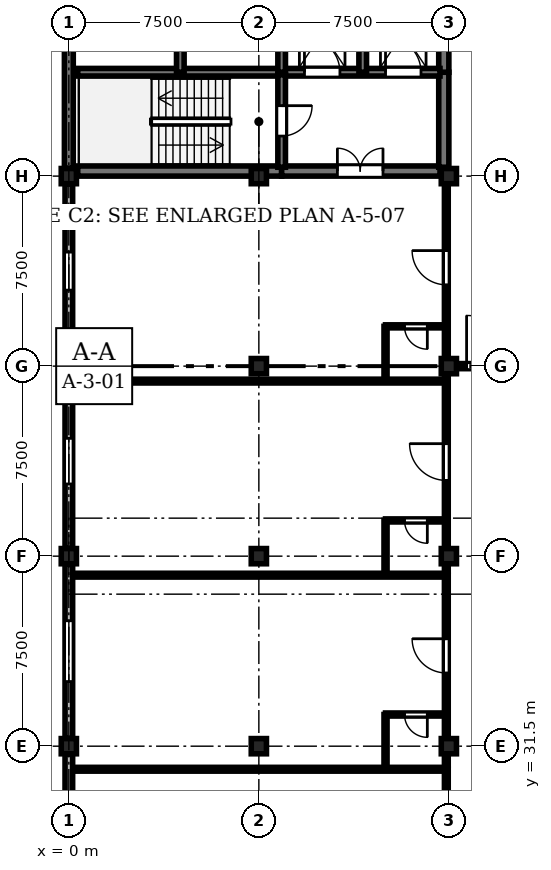
"""IFC4 building model, lengths in metres.
Left out: names, types, materials, properties, quantities, classifications, styles, units other than length and angle.
Written with IfcOpenShell. Run it as: python <this file> out.ifc"""

import sys

from ifc_helpers import new_model, si_unit, direction, frame, frame_2d, origin, origin_2d, place, context, subcontext, project, spatial, rectangle, circle, extrude, element, fill, save


model = new_model("IFC4")
c1 = context("Model", 3, precision=1e-05, world=origin(), true_north=direction((0.0, 1.0)))
c2 = subcontext(c1, "Body", "Model", "MODEL_VIEW")
j1 = project(units=[si_unit("LENGTHUNIT", "METRE"), si_unit("PLANEANGLEUNIT", "RADIAN")], contexts=[c1])
p1 = place(None, origin())
s1 = spatial("IfcSite", under=j1, at=p1, CompositionType="ELEMENT")
p2 = place(p1, origin())
s2 = spatial("IfcBuilding", under=s1, at=p2, CompositionType="ELEMENT")
p3 = place(p2, frame((0.0, 0.0, 21.9)))
s3 = spatial("IfcBuildingStorey", under=s2, at=p3, CompositionType="ELEMENT", Elevation=21.9)
for number, where, z_axis, x_axis in (
    (1, (0.0, 31.5, 0.0), (0.0, 0.0, 1.0), (1.0, 0.0, 0.0)),
    (2, (0.0, 39.0, 0.0), (0.0, 0.0, 1.0), (1.0, 0.0, 0.0)),
):
    element("IfcColumn", number, at=place(p3, frame(where, z_axis=z_axis, x_axis=x_axis)), inside=s3, PredefinedType="COLUMN", context=c2, shape_type="SweptSolid", body=[
        extrude(rectangle(XDim=0.6, YDim=0.6, at=origin_2d()), origin(), (0.0, 0.0, 1.0), 4.05),
    ])
p4 = place(p3, frame((0.0, 46.5, 0.0), z_axis=(0.0, 0.0, 1.0), x_axis=(1.0, 0.0, 0.0)))
e3 = element("IfcColumn", 3, at=p4, inside=s3, PredefinedType="COLUMN", context=c2, shape_type="SweptSolid", body=[
    extrude(circle(Radius=0.3, at=origin_2d()), origin(), (0.0, 0.0, 1.0), 4.05),
])
for number, where, z_axis, x_axis in (
    (4, (0.0, 54.0, 0.0), (0.0, 0.0, 1.0), (1.0, 0.0, 0.0)),
    (5, (7.5, 31.5, 0.0), (0.0, 0.0, 1.0), (1.0, 0.0, 0.0)),
):
    element("IfcColumn", number, at=place(p3, frame(where, z_axis=z_axis, x_axis=x_axis)), inside=s3, PredefinedType="COLUMN", context=c2, shape_type="SweptSolid", body=[
        extrude(rectangle(XDim=0.6, YDim=0.6, at=origin_2d()), origin(), (0.0, 0.0, 1.0), 4.05),
    ])
p5 = place(p3, frame((7.5, 39.0, 0.0), z_axis=(0.0, 0.0, 1.0), x_axis=(1.0, 0.0, 0.0)))
e6 = element("IfcColumn", 6, at=p5, inside=s3, PredefinedType="COLUMN", context=c2, shape_type="SweptSolid", body=[
    extrude(circle(Radius=0.3, at=origin_2d()), origin(), (0.0, 0.0, 1.0), 4.05),
])
for number, where, z_axis, x_axis in (
    (7, (7.5, 46.5, 0.0), (0.0, 0.0, 1.0), (1.0, 0.0, 0.0)),
    (8, (7.5, 54.0, 0.0), (0.0, 0.0, 1.0), (1.0, 0.0, 0.0)),
):
    element("IfcColumn", number, at=place(p3, frame(where, z_axis=z_axis, x_axis=x_axis)), inside=s3, PredefinedType="COLUMN", context=c2, shape_type="SweptSolid", body=[
        extrude(rectangle(XDim=0.6, YDim=0.6, at=origin_2d()), origin(), (0.0, 0.0, 1.0), 4.05),
    ])
p6 = place(p3, frame((15.0, 31.5, 0.0), z_axis=(0.0, 0.0, 1.0), x_axis=(1.0, 0.0, 0.0)))
e9 = element("IfcColumn", 9, at=p6, inside=s3, PredefinedType="COLUMN", context=c2, shape_type="SweptSolid", body=[
    extrude(circle(Radius=0.3, at=origin_2d()), origin(), (0.0, 0.0, 1.0), 4.05),
])
for number, where, z_axis, x_axis in (
    (10, (15.0, 39.0, 0.0), (0.0, 0.0, 1.0), (1.0, 0.0, 0.0)),
    (11, (15.0, 46.5, 0.0), (0.0, 0.0, 1.0), (1.0, 0.0, 0.0)),
):
    element("IfcColumn", number, at=place(p3, frame(where, z_axis=z_axis, x_axis=x_axis)), inside=s3, PredefinedType="COLUMN", context=c2, shape_type="SweptSolid", body=[
        extrude(rectangle(XDim=0.6, YDim=0.6, at=origin_2d()), origin(), (0.0, 0.0, 1.0), 4.05),
    ])
p7 = place(p3, frame((15.0, 54.0, 0.0), z_axis=(0.0, 0.0, 1.0), x_axis=(1.0, 0.0, 0.0)))
e12 = element("IfcColumn", 12, at=p7, inside=s3, PredefinedType="COLUMN", context=c2, shape_type="SweptSolid", body=[
    extrude(circle(Radius=0.3, at=origin_2d()), origin(), (0.0, 0.0, 1.0), 4.05),
])
p8 = place(p3, frame((0.0, 22.81, 0.0), z_axis=(0.0, 0.0, 1.0), x_axis=(0.0, 1.0, 0.0)))
e13 = element("IfcWall", 13, at=p8, inside=s3, PredefinedType="STANDARD", context=c2, shape_type="SweptSolid", body=[
    extrude(rectangle(XDim=8.38, YDim=0.3, at=frame_2d((4.19, 0.0))), origin(), (0.0, 0.0, 1.0), 3.22),
])
p9 = place(p8, frame((3.14, 0.0, 0.9)))
e14 = element("IfcOpeningElement", 14, at=p9, cuts=e13, PredefinedType="OPENING", context=c2, shape_type="SweptSolid", body=[
    extrude(rectangle(XDim=2.1, YDim=2.04, at=frame_2d((1.05, 1.02))), frame((0.0, 0.16, 0.0), z_axis=(0.0, -1.0, 0.0), x_axis=(1.0, 0.0, 0.0)), (0.0, 0.0, 1.0), 0.32),
])
p10 = place(p3, frame((0.0, 31.81, 0.0), z_axis=(0.0, 0.0, 1.0), x_axis=(0.0, 1.0, 0.0)))
e15 = element("IfcWall", 15, at=p10, inside=s3, PredefinedType="STANDARD", context=c2, shape_type="SweptSolid", body=[
    extrude(rectangle(XDim=6.88, YDim=0.3, at=frame_2d((3.44, 0.0))), origin(), (0.0, 0.0, 1.0), 3.17),
])
p11 = place(p10, frame((2.24, 0.0, 0.9)))
e16 = element("IfcOpeningElement", 16, at=p11, cuts=e15, PredefinedType="OPENING", context=c2, shape_type="SweptSolid", body=[
    extrude(rectangle(XDim=2.4, YDim=1.99, at=frame_2d((1.2, 0.995))), frame((0.0, 0.16, 0.0), z_axis=(0.0, -1.0, 0.0), x_axis=(1.0, 0.0, 0.0)), (0.0, 0.0, 1.0), 0.32),
])
p12 = place(p3, frame((0.0, 39.31, 0.0), z_axis=(0.0, 0.0, 1.0), x_axis=(0.0, 1.0, 0.0)))
e17 = element("IfcWall", 17, at=p12, inside=s3, PredefinedType="STANDARD", context=c2, shape_type="SweptSolid", body=[
    extrude(rectangle(XDim=6.88, YDim=0.3, at=frame_2d((3.44, 0.0))), origin(), (0.0, 0.0, 1.0), 3.17),
])
p13 = place(p12, frame((2.54, 0.0, 0.9)))
e18 = element("IfcOpeningElement", 18, at=p13, cuts=e17, PredefinedType="OPENING", context=c2, shape_type="SweptSolid", body=[
    extrude(rectangle(XDim=1.8, YDim=1.99, at=frame_2d((0.9, 0.995))), frame((0.0, 0.16, 0.0), z_axis=(0.0, -1.0, 0.0), x_axis=(1.0, 0.0, 0.0)), (0.0, 0.0, 1.0), 0.32),
])
p14 = place(p3, frame((0.0, 46.81, 0.0), z_axis=(0.0, 0.0, 1.0), x_axis=(0.0, 1.0, 0.0)))
e19 = element("IfcWall", 19, at=p14, inside=s3, PredefinedType="STANDARD", context=c2, shape_type="SweptSolid", body=[
    extrude(rectangle(XDim=6.88, YDim=0.3, at=frame_2d((3.44, 0.0))), origin(), (0.0, 0.0, 1.0), 3.17),
])
p15 = place(p14, frame((2.69, 0.0, 0.9)))
e20 = element("IfcOpeningElement", 20, at=p15, cuts=e19, PredefinedType="OPENING", context=c2, shape_type="SweptSolid", body=[
    extrude(rectangle(XDim=1.5, YDim=1.99, at=frame_2d((0.75, 0.995))), frame((0.0, 0.16, 0.0), z_axis=(0.0, -1.0, 0.0), x_axis=(1.0, 0.0, 0.0)), (0.0, 0.0, 1.0), 0.32),
])
p16 = place(p3, frame((0.0, 54.31, 0.0), z_axis=(0.0, 0.0, 1.0), x_axis=(0.0, 1.0, 0.0)))
e21 = element("IfcWall", 21, at=p16, inside=s3, PredefinedType="SHEAR", context=c2, shape_type="SweptSolid", body=[
    extrude(rectangle(XDim=6.88, YDim=0.35, at=frame_2d((3.44, 0.0))), origin(), (0.0, 0.0, 1.0), 3.77),
])
p17 = place(p3, frame((0.35, 54.2, 0.0), z_axis=(0.0, 0.0, 1.0), x_axis=(1.0, 0.0, 0.0)))
e22 = element("IfcWall", 22, at=p17, inside=s3, PredefinedType="SHEAR", context=c2, shape_type="SweptSolid", body=[
    extrude(rectangle(XDim=8.05, YDim=0.4, at=frame_2d((4.025, 0.0))), origin(), (0.0, 0.0, 1.0), 3.77),
])
p18 = place(p3, frame((8.4, 54.2, 0.0), z_axis=(0.0, 0.0, 1.0), x_axis=(1.0, 0.0, 0.0)))
e23 = element("IfcWall", 23, at=p18, inside=s3, PredefinedType="SHEAR", context=c2, shape_type="SweptSolid", body=[
    extrude(rectangle(XDim=6.25, YDim=0.4, at=frame_2d((3.125, 0.0))), origin(), (0.0, 0.0, 1.0), 3.77),
])
p19 = place(p18, frame((2.2, 0.0, 0.0)))
e24 = element("IfcOpeningElement", 24, at=p19, cuts=e23, PredefinedType="OPENING", context=c2, shape_type="SweptSolid", body=[
    extrude(rectangle(XDim=1.8, YDim=2.25, at=frame_2d((0.9, 1.125))), frame((0.0, 0.21, 0.0), z_axis=(0.0, -1.0, 0.0), x_axis=(1.0, 0.0, 0.0)), (0.0, 0.0, 1.0), 0.42),
])
p20 = place(p3, frame((14.8, 54.35, 0.0), z_axis=(0.0, 0.0, 1.0), x_axis=(0.0, 1.0, 0.0)))
e25 = element("IfcWall", 25, at=p20, inside=s3, PredefinedType="SHEAR", context=c2, shape_type="SweptSolid", body=[
    extrude(rectangle(XDim=3.75, YDim=0.4, at=frame_2d((1.875, 0.0))), origin(), (0.0, 0.0, 1.0), 3.77),
])
p21 = place(p3, frame((14.8, 58.1, 0.0), z_axis=(0.0, 0.0, 1.0), x_axis=(0.0, 1.0, 0.0)))
e26 = element("IfcWall", 26, at=p21, inside=s3, PredefinedType="SHEAR", context=c2, shape_type="SweptSolid", body=[
    extrude(rectangle(XDim=3.05, YDim=0.4, at=frame_2d((1.525, 0.0))), origin(), (0.0, 0.0, 1.0), 3.77),
])
p22 = place(p3, frame((0.35, 58.1, 0.0), z_axis=(0.0, 0.0, 1.0), x_axis=(1.0, 0.0, 0.0)))
e27 = element("IfcWall", 27, at=p22, inside=s3, PredefinedType="SHEAR", context=c2, shape_type="SweptSolid", body=[
    extrude(rectangle(XDim=8.05, YDim=0.3, at=frame_2d((4.025, 0.0))), origin(), (0.0, 0.0, 1.0), 3.77),
])
p23 = place(p3, frame((8.4, 58.1, 0.0), z_axis=(0.0, 0.0, 1.0), x_axis=(1.0, 0.0, 0.0)))
e28 = element("IfcWall", 28, at=p23, inside=s3, PredefinedType="SHEAR", context=c2, shape_type="SweptSolid", body=[
    extrude(rectangle(XDim=6.25, YDim=0.3, at=frame_2d((3.125, 0.0))), origin(), (0.0, 0.0, 1.0), 3.77),
])
p24 = place(p23, frame((0.9, 0.0, 0.0)))
e29 = element("IfcOpeningElement", 29, at=p24, cuts=e28, PredefinedType="OPENING", context=c2, shape_type="SweptSolid", body=[
    extrude(rectangle(XDim=1.4, YDim=2.25, at=frame_2d((0.7, 1.125))), frame((0.0, 0.16, 0.0), z_axis=(0.0, -1.0, 0.0), x_axis=(1.0, 0.0, 0.0)), (0.0, 0.0, 1.0), 0.32),
])
p25 = place(p23, frame((4.1, 0.0, 0.0)))
e30 = element("IfcOpeningElement", 30, at=p25, cuts=e28, PredefinedType="OPENING", context=c2, shape_type="SweptSolid", body=[
    extrude(rectangle(XDim=1.4, YDim=2.25, at=frame_2d((0.7, 1.125))), frame((0.0, 0.16, 0.0), z_axis=(0.0, -1.0, 0.0), x_axis=(1.0, 0.0, 0.0)), (0.0, 0.0, 1.0), 0.32),
])
p26 = place(p3, frame((8.4, 58.0, 0.0), z_axis=(0.0, 0.0, 1.0), x_axis=(0.0, -1.0, 0.0)))
e31 = element("IfcWall", 31, at=p26, inside=s3, PredefinedType="SHEAR", context=c2, shape_type="SweptSolid", body=[
    extrude(rectangle(XDim=3.65, YDim=0.3, at=frame_2d((1.825, 0.0))), origin(), (0.0, 0.0, 1.0), 3.77),
])
p27 = place(p26, frame((1.22, 0.0, 0.0)))
e32 = element("IfcOpeningElement", 32, at=p27, cuts=e31, PredefinedType="OPENING", context=c2, shape_type="SweptSolid", body=[
    extrude(rectangle(XDim=1.2, YDim=2.25, at=frame_2d((0.6, 1.125))), frame((0.0, 0.16, 0.0), z_axis=(0.0, -1.0, 0.0), x_axis=(1.0, 0.0, 0.0)), (0.0, 0.0, 1.0), 0.32),
])
for number, where, z_axis, x_axis in (
    (33, (4.4, 58.1, 0.0), (0.0, 0.0, 1.0), (0.0, 1.0, 0.0)),
    (34, (8.4, 58.1, 0.0), (0.0, 0.0, 1.0), (0.0, 1.0, 0.0)),
    (35, (11.6, 58.1, 0.0), (0.0, 0.0, 1.0), (0.0, 1.0, 0.0)),
):
    element("IfcWall", number, at=place(p3, frame(where, z_axis=z_axis, x_axis=x_axis)), inside=s3, PredefinedType="SHEAR", context=c2, shape_type="SweptSolid", body=[
        extrude(rectangle(XDim=3.15, YDim=0.3, at=frame_2d((1.575, 0.0))), origin(), (0.0, 0.0, 1.0), 3.77),
    ])
p28 = place(p3, frame((14.9, 23.09, 0.0), z_axis=(0.0, 0.0, 1.0), x_axis=(0.0, 1.0, 0.0)))
e36 = element("IfcWall", 36, at=p28, inside=s3, PredefinedType="PARTITIONING", context=c2, shape_type="SweptSolid", body=[
    extrude(rectangle(XDim=7.5, YDim=0.15, at=frame_2d((3.75, 0.0))), origin(), (0.0, 0.0, 1.0), 3.055),
])
p29 = place(p28, frame((3.025, 0.0, 0.0)))
e37 = element("IfcOpeningElement", 37, at=p29, cuts=e36, PredefinedType="OPENING", context=c2, shape_type="SweptSolid", body=[
    extrude(rectangle(XDim=1.45, YDim=2.3, at=frame_2d((0.725, 1.15))), frame((0.0, 0.085, 0.0), z_axis=(0.0, -1.0, 0.0), x_axis=(1.0, 0.0, 0.0)), (0.0, 0.0, 1.0), 0.17),
])
p30 = place(p3, frame((14.9, 30.75, 0.0), z_axis=(0.0, 0.0, 1.0), x_axis=(0.0, 1.0, 0.0)))
e38 = element("IfcWall", 38, at=p30, inside=s3, PredefinedType="PARTITIONING", context=c2, shape_type="SweptSolid", body=[
    extrude(rectangle(XDim=7.5, YDim=0.15, at=frame_2d((3.75, 0.0))), origin(), (0.0, 0.0, 1.0), 3.055),
])
p31 = place(p30, frame((3.64, 0.0, 0.0)))
e39 = element("IfcOpeningElement", 39, at=p31, cuts=e38, PredefinedType="OPENING", context=c2, shape_type="SweptSolid", body=[
    extrude(rectangle(XDim=1.35, YDim=2.25, at=frame_2d((0.675, 1.125))), frame((0.0, 0.085, 0.0), z_axis=(0.0, -1.0, 0.0), x_axis=(1.0, 0.0, 0.0)), (0.0, 0.0, 1.0), 0.17),
])
p32 = place(p3, frame((14.9, 32.75, 0.0), z_axis=(0.0, 0.0, 1.0), x_axis=(-1.0, 0.0, 0.0)))
e40 = element("IfcWall", 40, at=p32, inside=s3, PredefinedType="PARTITIONING", context=c2, shape_type="SweptSolid", body=[
    extrude(rectangle(XDim=2.4, YDim=0.12, at=frame_2d((1.2, 0.0))), origin(), (0.0, 0.0, 1.0), 3.755),
])
p33 = place(p32, frame((0.75, 0.0, 0.0)))
e41 = element("IfcOpeningElement", 41, at=p33, cuts=e40, PredefinedType="OPENING", context=c2, shape_type="SweptSolid", body=[
    extrude(rectangle(XDim=0.9, YDim=2.1, at=frame_2d((0.45, 1.05))), frame((0.0, 0.07, 0.0), z_axis=(0.0, -1.0, 0.0), x_axis=(1.0, 0.0, 0.0)), (0.0, 0.0, 1.0), 0.14),
])
p34 = place(p3, frame((12.5, 30.75, 0.0), z_axis=(0.0, 0.0, 1.0), x_axis=(0.0, 1.0, 0.0)))
e42 = element("IfcWall", 42, at=p34, inside=s3, PredefinedType="PARTITIONING", context=c2, shape_type="SweptSolid", body=[
    extrude(rectangle(XDim=2.0, YDim=0.12, at=frame_2d((1.0, 0.0))), origin(), (0.0, 0.0, 1.0), 3.755),
])
p35 = place(p3, frame((14.9, 38.41, 0.0), z_axis=(0.0, 0.0, 1.0), x_axis=(0.0, 1.0, 0.0)))
e43 = element("IfcWall", 43, at=p35, inside=s3, PredefinedType="PARTITIONING", context=c2, shape_type="SweptSolid", body=[
    extrude(rectangle(XDim=7.5, YDim=0.15, at=frame_2d((3.75, 0.0))), origin(), (0.0, 0.0, 1.0), 3.205),
])
p36 = place(p35, frame((3.58, 0.0, 0.0)))
e44 = element("IfcOpeningElement", 44, at=p36, cuts=e43, PredefinedType="OPENING", context=c2, shape_type="SweptSolid", body=[
    extrude(rectangle(XDim=1.45, YDim=2.3, at=frame_2d((0.725, 1.15))), frame((0.0, 0.085, 0.0), z_axis=(0.0, -1.0, 0.0), x_axis=(1.0, 0.0, 0.0)), (0.0, 0.0, 1.0), 0.17),
])
p37 = place(p3, frame((14.9, 40.41, 0.0), z_axis=(0.0, 0.0, 1.0), x_axis=(-1.0, 0.0, 0.0)))
e45 = element("IfcWall", 45, at=p37, inside=s3, PredefinedType="PARTITIONING", context=c2, shape_type="SweptSolid", body=[
    extrude(rectangle(XDim=2.4, YDim=0.12, at=frame_2d((1.2, 0.0))), origin(), (0.0, 0.0, 1.0), 3.755),
])
p38 = place(p37, frame((0.75, 0.0, 0.0)))
e46 = element("IfcOpeningElement", 46, at=p38, cuts=e45, PredefinedType="OPENING", context=c2, shape_type="SweptSolid", body=[
    extrude(rectangle(XDim=0.9, YDim=2.1, at=frame_2d((0.45, 1.05))), frame((0.0, 0.07, 0.0), z_axis=(0.0, -1.0, 0.0), x_axis=(1.0, 0.0, 0.0)), (0.0, 0.0, 1.0), 0.14),
])
p39 = place(p3, frame((12.5, 38.41, 0.0), z_axis=(0.0, 0.0, 1.0), x_axis=(0.0, 1.0, 0.0)))
e47 = element("IfcWall", 47, at=p39, inside=s3, PredefinedType="PARTITIONING", context=c2, shape_type="SweptSolid", body=[
    extrude(rectangle(XDim=2.0, YDim=0.12, at=frame_2d((1.0, 0.0))), origin(), (0.0, 0.0, 1.0), 3.755),
])
p40 = place(p3, frame((14.9, 46.07, 0.0), z_axis=(0.0, 0.0, 1.0), x_axis=(0.0, 1.0, 0.0)))
e48 = element("IfcWall", 48, at=p40, inside=s3, PredefinedType="PARTITIONING", context=c2, shape_type="SweptSolid", body=[
    extrude(rectangle(XDim=7.5, YDim=0.15, at=frame_2d((3.75, 0.0))), origin(), (0.0, 0.0, 1.0), 3.205),
])
p41 = place(p40, frame((3.64, 0.0, 0.0)))
e49 = element("IfcOpeningElement", 49, at=p41, cuts=e48, PredefinedType="OPENING", context=c2, shape_type="SweptSolid", body=[
    extrude(rectangle(XDim=1.35, YDim=2.25, at=frame_2d((0.675, 1.125))), frame((0.0, 0.085, 0.0), z_axis=(0.0, -1.0, 0.0), x_axis=(1.0, 0.0, 0.0)), (0.0, 0.0, 1.0), 0.17),
])
p42 = place(p3, frame((14.9, 48.07, 0.0), z_axis=(0.0, 0.0, 1.0), x_axis=(-1.0, 0.0, 0.0)))
e50 = element("IfcWall", 50, at=p42, inside=s3, PredefinedType="PARTITIONING", context=c2, shape_type="SweptSolid", body=[
    extrude(rectangle(XDim=2.4, YDim=0.12, at=frame_2d((1.2, 0.0))), origin(), (0.0, 0.0, 1.0), 3.755),
])
p43 = place(p42, frame((0.75, 0.0, 0.0)))
e51 = element("IfcOpeningElement", 51, at=p43, cuts=e50, PredefinedType="OPENING", context=c2, shape_type="SweptSolid", body=[
    extrude(rectangle(XDim=0.9, YDim=2.1, at=frame_2d((0.45, 1.05))), frame((0.0, 0.07, 0.0), z_axis=(0.0, -1.0, 0.0), x_axis=(1.0, 0.0, 0.0)), (0.0, 0.0, 1.0), 0.14),
])
p44 = place(p3, frame((12.5, 46.07, 0.0), z_axis=(0.0, 0.0, 1.0), x_axis=(0.0, 1.0, 0.0)))
e52 = element("IfcWall", 52, at=p44, inside=s3, PredefinedType="PARTITIONING", context=c2, shape_type="SweptSolid", body=[
    extrude(rectangle(XDim=2.0, YDim=0.12, at=frame_2d((1.0, 0.0))), origin(), (0.0, 0.0, 1.0), 3.755),
])
for number, where, z_axis, x_axis in (
    (53, (0.35, 30.59, 0.0), (0.0, 0.0, 1.0), (1.0, 0.0, 0.0)),
    (54, (0.35, 38.25, 0.0), (0.0, 0.0, 1.0), (1.0, 0.0, 0.0)),
    (55, (0.35, 45.91, 0.0), (0.0, 0.0, 1.0), (1.0, 0.0, 0.0)),
):
    element("IfcWall", number, at=place(p3, frame(where, z_axis=z_axis, x_axis=x_axis)), inside=s3, PredefinedType="PARTITIONING", context=c2, shape_type="SweptSolid", body=[
        extrude(rectangle(XDim=14.55, YDim=0.15, at=frame_2d((7.275, 0.0))), origin(), (0.0, 0.0, 1.0), 3.755),
    ])
p45 = place(p3, frame((15.2, 46.5, 0.0), z_axis=(0.0, 0.0, 1.0), x_axis=(1.0, 0.0, 0.0)))
e56 = element("IfcWall", 56, at=p45, inside=s3, PredefinedType="STANDARD", context=c2, shape_type="SweptSolid", body=[
    extrude(rectangle(XDim=3.0, YDim=0.2, at=frame_2d((1.5, 0.0))), origin(), (0.0, 0.0, 1.0), 3.155),
])
p46 = place(p45, frame((0.5, 0.0, 0.0)))
e57 = element("IfcOpeningElement", 57, at=p46, cuts=e56, PredefinedType="OPENING", context=c2, shape_type="SweptSolid", body=[
    extrude(rectangle(XDim=2.0, YDim=2.3, at=frame_2d((1.0, 1.15))), frame((0.0, 0.11, 0.0), z_axis=(0.0, -1.0, 0.0), x_axis=(1.0, 0.0, 0.0)), (0.0, 0.0, 1.0), 0.22),
])
p47 = place(p11, origin())
e58 = element("IfcWindow", 58, at=p47, inside=s3, PartitioningType="SINGLE_PANEL", PredefinedType="WINDOW", context=c2, shape_type="SweptSolid", body=[
    extrude(rectangle(XDim=2.4, YDim=1.99, at=frame_2d((1.2, 0.995))), frame((0.0, 0.03, 0.0), z_axis=(0.0, -1.0, 0.0), x_axis=(1.0, 0.0, 0.0)), (0.0, 0.0, 1.0), 0.06),
])
fill(e16, e58)
p48 = place(p13, origin())
e59 = element("IfcWindow", 59, at=p48, inside=s3, PartitioningType="SINGLE_PANEL", PredefinedType="WINDOW", context=c2, shape_type="SweptSolid", body=[
    extrude(rectangle(XDim=1.8, YDim=1.99, at=frame_2d((0.9, 0.995))), frame((0.0, 0.03, 0.0), z_axis=(0.0, -1.0, 0.0), x_axis=(1.0, 0.0, 0.0)), (0.0, 0.0, 1.0), 0.06),
])
fill(e18, e59)
p49 = place(p15, origin())
e60 = element("IfcWindow", 60, at=p49, inside=s3, PartitioningType="SINGLE_PANEL", PredefinedType="WINDOW", context=c2, shape_type="SweptSolid", body=[
    extrude(rectangle(XDim=1.5, YDim=1.99, at=frame_2d((0.75, 0.995))), frame((0.0, 0.03, 0.0), z_axis=(0.0, -1.0, 0.0), x_axis=(1.0, 0.0, 0.0)), (0.0, 0.0, 1.0), 0.06),
])
fill(e20, e60)
p50 = place(p19, origin())
e61 = element("IfcDoor", 61, at=p50, inside=s3, OperationType="DOUBLE_DOOR_SINGLE_SWING", PredefinedType="DOOR", context=c2, shape_type="SweptSolid", body=[
    extrude(rectangle(XDim=1.8, YDim=2.25, at=frame_2d((0.9, 1.125))), frame((0.0, 0.025, 0.0), z_axis=(0.0, -1.0, 0.0), x_axis=(1.0, 0.0, 0.0)), (0.0, 0.0, 1.0), 0.05),
])
fill(e24, e61)
p51 = place(p24, origin())
e62 = element("IfcDoor", 62, at=p51, inside=s3, OperationType="DOUBLE_DOOR_SLIDING", PredefinedType="DOOR", context=c2, shape_type="SweptSolid", body=[
    extrude(rectangle(XDim=1.4, YDim=2.25, at=frame_2d((0.7, 1.125))), frame((0.0, 0.025, 0.0), z_axis=(0.0, -1.0, 0.0), x_axis=(1.0, 0.0, 0.0)), (0.0, 0.0, 1.0), 0.05),
])
fill(e29, e62)
p52 = place(p25, origin())
e63 = element("IfcDoor", 63, at=p52, inside=s3, OperationType="DOUBLE_DOOR_SLIDING", PredefinedType="DOOR", context=c2, shape_type="SweptSolid", body=[
    extrude(rectangle(XDim=1.4, YDim=2.25, at=frame_2d((0.7, 1.125))), frame((0.0, 0.025, 0.0), z_axis=(0.0, -1.0, 0.0), x_axis=(1.0, 0.0, 0.0)), (0.0, 0.0, 1.0), 0.05),
])
fill(e30, e63)
p53 = place(p27, origin())
e64 = element("IfcDoor", 64, at=p53, inside=s3, OperationType="SINGLE_SWING_LEFT", PredefinedType="DOOR", context=c2, shape_type="SweptSolid", body=[
    extrude(rectangle(XDim=1.2, YDim=2.25, at=frame_2d((0.6, 1.125))), frame((0.0, 0.025, 0.0), z_axis=(0.0, -1.0, 0.0), x_axis=(1.0, 0.0, 0.0)), (0.0, 0.0, 1.0), 0.05),
])
fill(e32, e64)
p54 = place(p31, origin())
e65 = element("IfcDoor", 65, at=p54, inside=s3, OperationType="SINGLE_SWING_RIGHT", PredefinedType="DOOR", context=c2, shape_type="SweptSolid", body=[
    extrude(rectangle(XDim=1.35, YDim=2.25, at=frame_2d((0.675, 1.125))), frame((0.0, 0.025, 0.0), z_axis=(0.0, -1.0, 0.0), x_axis=(1.0, 0.0, 0.0)), (0.0, 0.0, 1.0), 0.05),
])
fill(e39, e65)
p55 = place(p33, origin())
e66 = element("IfcDoor", 66, at=p55, inside=s3, OperationType="SINGLE_SWING_LEFT", PredefinedType="DOOR", context=c2, shape_type="SweptSolid", body=[
    extrude(rectangle(XDim=0.9, YDim=2.1, at=frame_2d((0.45, 1.05))), frame((0.0, 0.025, 0.0), z_axis=(0.0, -1.0, 0.0), x_axis=(1.0, 0.0, 0.0)), (0.0, 0.0, 1.0), 0.05),
])
fill(e41, e66)
p56 = place(p36, origin())
e67 = element("IfcDoor", 67, at=p56, inside=s3, OperationType="SINGLE_SWING_RIGHT", PredefinedType="DOOR", context=c2, shape_type="SweptSolid", body=[
    extrude(rectangle(XDim=1.45, YDim=2.3, at=frame_2d((0.725, 1.15))), frame((0.0, 0.025, 0.0), z_axis=(0.0, -1.0, 0.0), x_axis=(1.0, 0.0, 0.0)), (0.0, 0.0, 1.0), 0.05),
])
fill(e44, e67)
p57 = place(p38, origin())
e68 = element("IfcDoor", 68, at=p57, inside=s3, OperationType="SINGLE_SWING_LEFT", PredefinedType="DOOR", context=c2, shape_type="SweptSolid", body=[
    extrude(rectangle(XDim=0.9, YDim=2.1, at=frame_2d((0.45, 1.05))), frame((0.0, 0.025, 0.0), z_axis=(0.0, -1.0, 0.0), x_axis=(1.0, 0.0, 0.0)), (0.0, 0.0, 1.0), 0.05),
])
fill(e46, e68)
p58 = place(p41, origin())
e69 = element("IfcDoor", 69, at=p58, inside=s3, OperationType="SINGLE_SWING_RIGHT", PredefinedType="DOOR", context=c2, shape_type="SweptSolid", body=[
    extrude(rectangle(XDim=1.35, YDim=2.25, at=frame_2d((0.675, 1.125))), frame((0.0, 0.025, 0.0), z_axis=(0.0, -1.0, 0.0), x_axis=(1.0, 0.0, 0.0)), (0.0, 0.0, 1.0), 0.05),
])
fill(e49, e69)
p59 = place(p43, origin())
e70 = element("IfcDoor", 70, at=p59, inside=s3, OperationType="SINGLE_SWING_LEFT", PredefinedType="DOOR", context=c2, shape_type="SweptSolid", body=[
    extrude(rectangle(XDim=0.9, YDim=2.1, at=frame_2d((0.45, 1.05))), frame((0.0, 0.025, 0.0), z_axis=(0.0, -1.0, 0.0), x_axis=(1.0, 0.0, 0.0)), (0.0, 0.0, 1.0), 0.05),
])
fill(e51, e70)
p60 = place(p46, origin())
e71 = element("IfcDoor", 71, at=p60, inside=s3, OperationType="DOUBLE_DOOR_SINGLE_SWING", PredefinedType="DOOR", context=c2, shape_type="SweptSolid", body=[
    extrude(rectangle(XDim=2.0, YDim=2.3, at=frame_2d((1.0, 1.15))), frame((0.0, 0.025, 0.0), z_axis=(0.0, -1.0, 0.0), x_axis=(1.0, 0.0, 0.0)), (0.0, 0.0, 1.0), 0.05),
])
fill(e57, e71)
save(model, sys.argv[1])
